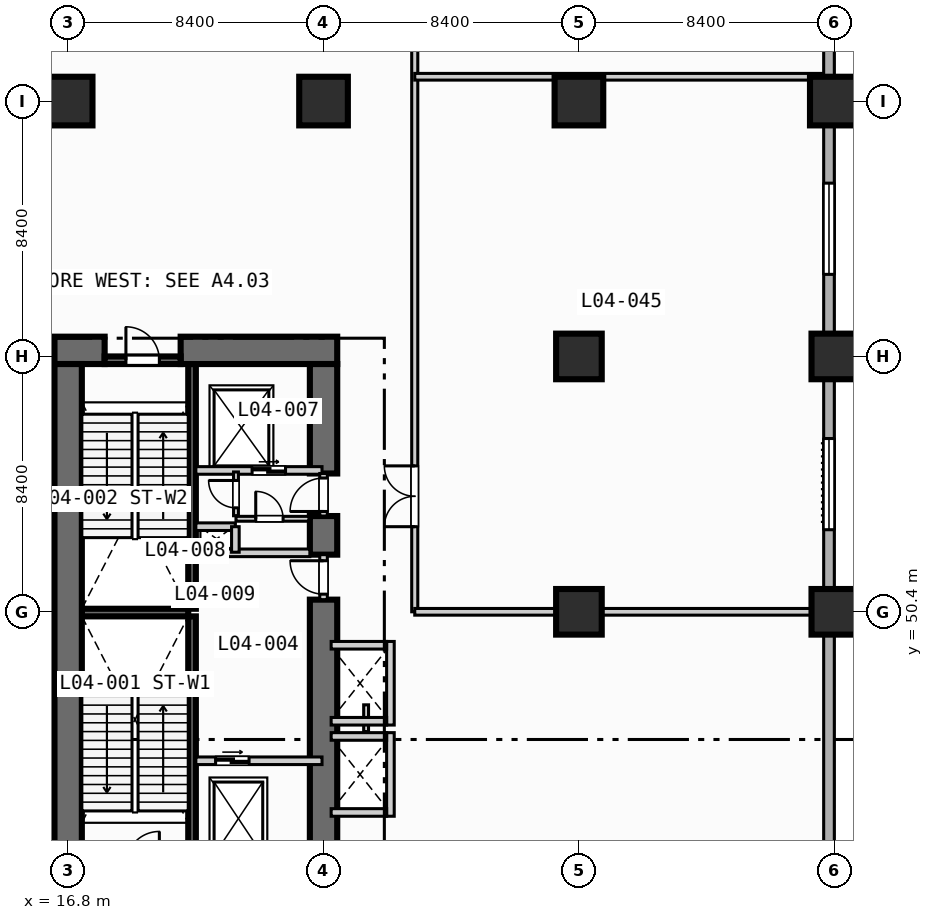
"""IFC4 building model, lengths in metres.
Left out: names, types, materials, properties, quantities, classifications, styles, units other than length and angle.
Written with IfcOpenShell. Run it as: python <this file> out.ifc"""

import sys

from ifc_helpers import new_model, si_unit, direction, frame, frame_2d, origin, origin_2d, place, context, subcontext, project, spatial, rectangle, extrude, element, fill, save


model = new_model("IFC4")
c1 = context("Model", 3, precision=1e-05, world=origin(), true_north=direction((0.0, 1.0)))
c2 = subcontext(c1, "Body", "Model", "MODEL_VIEW")
j1 = project(units=[si_unit("LENGTHUNIT", "METRE"), si_unit("PLANEANGLEUNIT", "RADIAN")], contexts=[c1])
p1 = place(None, origin())
s1 = spatial("IfcSite", under=j1, at=p1, CompositionType="ELEMENT")
p2 = place(p1, origin())
s2 = spatial("IfcBuilding", under=s1, at=p2, CompositionType="ELEMENT")
p3 = place(p2, frame((0.0, 0.0, 20.8)))
s3 = spatial("IfcBuildingStorey", under=s2, at=p3, CompositionType="ELEMENT", Elevation=20.8)
for number, where, z_axis, x_axis in (
    (1, (20.875, 42.2, 0.0), (0.0, 0.0, 1.0), (0.0, 1.0, 0.0)),
    (2, (20.875, 50.5, 0.0), (0.0, 0.0, 1.0), (0.0, 1.0, 0.0)),
):
    element("IfcWall", number, at=place(p3, frame(where, z_axis=z_axis, x_axis=x_axis)), inside=s3, PredefinedType="SOLIDWALL", context=c2, shape_type="SweptSolid", body=[
        extrude(rectangle(XDim=8.05, YDim=0.25, at=frame_2d((4.025, 0.0))), origin(), (0.0, 0.0, 1.0), 4.75),
    ])
p4 = place(p3, frame((17.25, 50.375, 0.0), z_axis=(0.0, 0.0, 1.0), x_axis=(1.0, 0.0, 0.0)))
e3 = element("IfcWall", 3, at=p4, inside=s3, PredefinedType="SOLIDWALL", context=c2, shape_type="SweptSolid", body=[
    extrude(rectangle(XDim=3.5, YDim=0.25, at=frame_2d((1.75, 0.0))), origin(), (0.0, 0.0, 1.0), 4.75),
])
p5 = place(p3, frame((16.35, 59.0, 0.0), z_axis=(0.0, 0.0, 1.0), x_axis=(1.0, 0.0, 0.0)))
e4 = element("IfcWall", 4, at=p5, inside=s3, PredefinedType="SHEAR", context=c2, shape_type="SweptSolid", body=[
    extrude(rectangle(XDim=1.65, YDim=0.9, at=frame_2d((0.825, 0.0))), origin(), (0.0, 0.0, 1.0), 4.75),
])
p6 = place(p3, frame((20.5, 59.0, 0.0), z_axis=(0.0, 0.0, 1.0), x_axis=(1.0, 0.0, 0.0)))
e5 = element("IfcWall", 5, at=p6, inside=s3, PredefinedType="SHEAR", context=c2, shape_type="SweptSolid", body=[
    extrude(rectangle(XDim=5.15, YDim=0.9, at=frame_2d((2.575, 0.0))), origin(), (0.0, 0.0, 1.0), 4.75),
])
p7 = place(p3, frame((16.8, 42.2, 0.0), z_axis=(0.0, 0.0, 1.0), x_axis=(0.0, 1.0, 0.0)))
e6 = element("IfcWall", 6, at=p7, inside=s3, PredefinedType="SHEAR", context=c2, shape_type="SweptSolid", body=[
    extrude(rectangle(XDim=16.35, YDim=0.9, at=frame_2d((8.175, 0.0))), origin(), (0.0, 0.0, 1.0), 4.75),
])
p8 = place(p3, frame((25.2, 42.2, 0.0), z_axis=(0.0, 0.0, 1.0), x_axis=(0.0, 1.0, 0.0)))
e7 = element("IfcWall", 7, at=p8, inside=s3, PredefinedType="SHEAR", context=c2, shape_type="SweptSolid", body=[
    extrude(rectangle(XDim=8.6, YDim=0.9, at=frame_2d((4.3, 0.0))), origin(), (0.0, 0.0, 1.0), 4.75),
])
p9 = place(p3, frame((25.2, 52.28, 0.0), z_axis=(0.0, 0.0, 1.0), x_axis=(0.0, 1.0, 0.0)))
e8 = element("IfcWall", 8, at=p9, inside=s3, PredefinedType="SHEAR", context=c2, shape_type="SweptSolid", body=[
    extrude(rectangle(XDim=1.27, YDim=0.9, at=frame_2d((0.635, 0.0))), origin(), (0.0, 0.0, 1.0), 4.75),
])
p10 = place(p3, frame((25.2, 54.95, 0.0), z_axis=(0.0, 0.0, 1.0), x_axis=(0.0, 1.0, 0.0)))
e9 = element("IfcWall", 9, at=p10, inside=s3, PredefinedType="SHEAR", context=c2, shape_type="SweptSolid", body=[
    extrude(rectangle(XDim=3.6, YDim=0.9, at=frame_2d((1.8, 0.0))), origin(), (0.0, 0.0, 1.0), 4.75),
])
for number, where, z_axis, x_axis in (
    (10, (16.8, 67.2, 0.0), (0.0, 0.0, 1.0), (1.0, 0.0, 0.0)),
    (11, (25.2, 67.2, 0.0), (0.0, 0.0, 1.0), (1.0, 0.0, 0.0)),
):
    element("IfcColumn", number, at=place(p3, frame(where, z_axis=z_axis, x_axis=x_axis)), inside=s3, PredefinedType="COLUMN", context=c2, shape_type="SweptSolid", body=[
        extrude(rectangle(XDim=1.6, YDim=1.6, at=origin_2d()), origin(), (0.0, 0.0, 1.0), 5.2),
    ])
for number, where, z_axis, x_axis in (
    (12, (33.6, 50.4, 0.0), (0.0, 0.0, 1.0), (1.0, 0.0, 0.0)),
    (13, (33.6, 58.8, 0.0), (0.0, 0.0, 1.0), (1.0, 0.0, 0.0)),
):
    element("IfcColumn", number, at=place(p3, frame(where, z_axis=z_axis, x_axis=x_axis)), inside=s3, PredefinedType="COLUMN", context=c2, shape_type="SweptSolid", body=[
        extrude(rectangle(XDim=1.5, YDim=1.5, at=origin_2d()), origin(), (0.0, 0.0, 1.0), 5.2),
    ])
p11 = place(p3, frame((33.6, 67.2, 0.0), z_axis=(0.0, 0.0, 1.0), x_axis=(1.0, 0.0, 0.0)))
e14 = element("IfcColumn", 14, at=p11, inside=s3, PredefinedType="COLUMN", context=c2, shape_type="SweptSolid", body=[
    extrude(rectangle(XDim=1.6, YDim=1.6, at=origin_2d()), origin(), (0.0, 0.0, 1.0), 5.2),
])
for number, where, z_axis, x_axis in (
    (15, (42.0, 50.4, 0.0), (0.0, 0.0, 1.0), (1.0, 0.0, 0.0)),
    (16, (42.0, 58.8, 0.0), (0.0, 0.0, 1.0), (1.0, 0.0, 0.0)),
):
    element("IfcColumn", number, at=place(p3, frame(where, z_axis=z_axis, x_axis=x_axis)), inside=s3, PredefinedType="COLUMN", context=c2, shape_type="SweptSolid", body=[
        extrude(rectangle(XDim=1.5, YDim=1.5, at=origin_2d()), origin(), (0.0, 0.0, 1.0), 5.2),
    ])
p12 = place(p3, frame((42.0, 67.2, 0.0), z_axis=(0.0, 0.0, 1.0), x_axis=(1.0, 0.0, 0.0)))
e17 = element("IfcColumn", 17, at=p12, inside=s3, PredefinedType="COLUMN", context=c2, shape_type="SweptSolid", body=[
    extrude(rectangle(XDim=1.6, YDim=1.6, at=origin_2d()), origin(), (0.0, 0.0, 1.0), 5.2),
])
p13 = place(p3, frame((41.825, 89.225, 0.0), z_axis=(0.0, 0.0, 1.0), x_axis=(0.0, -1.0, 0.0)))
e18 = element("IfcWall", 18, at=p13, inside=s3, PredefinedType="STANDARD", context=c2, shape_type="SweptSolid", body=[
    extrude(rectangle(XDim=47.4, YDim=0.35, at=frame_2d((23.7, 0.0))), origin(), (0.0, 0.0, 1.0), 4.75),
])
p14 = place(p13, frame((33.125, 0.0, 0.85)))
e19 = element("IfcOpeningElement", 19, at=p14, cuts=e18, PredefinedType="OPENING", context=c2, shape_type="SweptSolid", body=[
    extrude(rectangle(XDim=3.0, YDim=2.4, at=frame_2d((1.5, 1.2))), frame((0.0, 0.185, 0.0), z_axis=(0.0, -1.0, 0.0), x_axis=(1.0, 0.0, 0.0)), (0.0, 0.0, 1.0), 0.37),
])
p15 = place(p13, frame((24.725, 0.0, 0.85)))
e20 = element("IfcOpeningElement", 20, at=p15, cuts=e18, PredefinedType="OPENING", context=c2, shape_type="SweptSolid", body=[
    extrude(rectangle(XDim=3.0, YDim=2.4, at=frame_2d((1.5, 1.2))), frame((0.0, 0.185, 0.0), z_axis=(0.0, -1.0, 0.0), x_axis=(1.0, 0.0, 0.0)), (0.0, 0.0, 1.0), 0.37),
])
p16 = place(p13, frame((16.325, 0.0, 0.85)))
e21 = element("IfcOpeningElement", 21, at=p16, cuts=e18, PredefinedType="OPENING", context=c2, shape_type="SweptSolid", body=[
    extrude(rectangle(XDim=3.0, YDim=2.4, at=frame_2d((1.5, 1.2))), frame((0.0, 0.185, 0.0), z_axis=(0.0, -1.0, 0.0), x_axis=(1.0, 0.0, 0.0)), (0.0, 0.0, 1.0), 0.37),
])
p17 = place(p13, frame((7.925, 0.0, 0.85)))
e22 = element("IfcOpeningElement", 22, at=p17, cuts=e18, PredefinedType="OPENING", context=c2, shape_type="SweptSolid", body=[
    extrude(rectangle(XDim=3.0, YDim=2.4, at=frame_2d((1.5, 1.2))), frame((0.0, 0.185, 0.0), z_axis=(0.0, -1.0, 0.0), x_axis=(1.0, 0.0, 0.0)), (0.0, 0.0, 1.0), 0.37),
])
p18 = place(p3, frame((18.0, 58.675, 0.0), z_axis=(0.0, 0.0, 1.0), x_axis=(1.0, 0.0, 0.0)))
e23 = element("IfcWall", 23, at=p18, inside=s3, PredefinedType="SOLIDWALL", context=c2, shape_type="SweptSolid", body=[
    extrude(rectangle(XDim=2.5, YDim=0.25, at=frame_2d((1.25, 0.0))), origin(), (0.0, 0.0, 1.0), 4.75),
])
p19 = place(p18, frame((0.7, 0.0, 0.0)))
e24 = element("IfcOpeningElement", 24, at=p19, cuts=e23, PredefinedType="OPENING", context=c2, shape_type="SweptSolid", body=[
    extrude(rectangle(XDim=1.1, YDim=2.15, at=frame_2d((0.55, 1.075))), frame((0.0, 0.135, 0.0), z_axis=(0.0, -1.0, 0.0), x_axis=(1.0, 0.0, 0.0)), (0.0, 0.0, 1.0), 0.27),
])
p20 = place(p3, frame((21.0, 45.5, 0.0), z_axis=(0.0, 0.0, 1.0), x_axis=(1.0, 0.0, 0.0)))
e25 = element("IfcWall", 25, at=p20, inside=s3, PredefinedType="SOLIDWALL", context=c2, shape_type="SweptSolid", body=[
    extrude(rectangle(XDim=4.15, YDim=0.25, at=frame_2d((2.075, 0.0))), origin(), (0.0, 0.0, 1.0), 4.75),
])
p21 = place(p20, frame((0.65, 0.0, 0.0)))
e26 = element("IfcOpeningElement", 26, at=p21, cuts=e25, PredefinedType="OPENING", context=c2, shape_type="SweptSolid", body=[
    extrude(rectangle(XDim=1.1, YDim=2.15, at=frame_2d((0.55, 1.075))), frame((0.0, 0.135, 0.0), z_axis=(0.0, -1.0, 0.0), x_axis=(1.0, 0.0, 0.0)), (0.0, 0.0, 1.0), 0.27),
])
p22 = place(p3, frame((25.2, 50.8, 0.0), z_axis=(0.0, 0.0, 1.0), x_axis=(0.0, 1.0, 0.0)))
e27 = element("IfcWall", 27, at=p22, inside=s3, PredefinedType="SOLIDWALL", context=c2, shape_type="SweptSolid", body=[
    extrude(rectangle(XDim=1.48, YDim=0.25, at=frame_2d((0.74, 0.0))), origin(), (0.0, 0.0, 1.0), 4.75),
])
p23 = place(p22, frame((0.18, 0.0, 0.0)))
e28 = element("IfcOpeningElement", 28, at=p23, cuts=e27, PredefinedType="OPENING", context=c2, shape_type="SweptSolid", body=[
    extrude(rectangle(XDim=1.1, YDim=2.15, at=frame_2d((0.55, 1.075))), frame((0.0, 0.135, 0.0), z_axis=(0.0, -1.0, 0.0), x_axis=(1.0, 0.0, 0.0)), (0.0, 0.0, 1.0), 0.27),
])
p24 = place(p3, frame((21.0, 52.34, 0.0), z_axis=(0.0, 0.0, 1.0), x_axis=(1.0, 0.0, 0.0)))
e29 = element("IfcWall", 29, at=p24, inside=s3, PredefinedType="SOLIDWALL", context=c2, shape_type="SweptSolid", body=[
    extrude(rectangle(XDim=3.75, YDim=0.25, at=frame_2d((1.875, 0.0))), origin(), (0.0, 0.0, 1.0), 4.75),
])
p25 = place(p3, frame((21.0, 55.05, 0.0), z_axis=(0.0, 0.0, 1.0), x_axis=(1.0, 0.0, 0.0)))
e30 = element("IfcWall", 30, at=p25, inside=s3, PredefinedType="SOLIDWALL", context=c2, shape_type="SweptSolid", body=[
    extrude(rectangle(XDim=4.15, YDim=0.25, at=frame_2d((2.075, 0.0))), origin(), (0.0, 0.0, 1.0), 4.75),
])
p26 = place(p25, frame((1.85, 0.0, 0.0)))
e31 = element("IfcOpeningElement", 31, at=p26, cuts=e30, PredefinedType="OPENING", context=c2, shape_type="SweptSolid", body=[
    extrude(rectangle(XDim=1.1, YDim=2.15, at=frame_2d((0.55, 1.075))), frame((0.0, 0.135, 0.0), z_axis=(0.0, -1.0, 0.0), x_axis=(1.0, 0.0, 0.0)), (0.0, 0.0, 1.0), 0.27),
])
p27 = place(p3, frame((25.2, 53.55, 0.0), z_axis=(0.0, 0.0, 1.0), x_axis=(0.0, 1.0, 0.0)))
e32 = element("IfcWall", 32, at=p27, inside=s3, PredefinedType="SOLIDWALL", context=c2, shape_type="SweptSolid", body=[
    extrude(rectangle(XDim=1.4, YDim=0.25, at=frame_2d((0.7, 0.0))), origin(), (0.0, 0.0, 1.0), 4.75),
])
p28 = place(p27, frame((0.15, 0.0, 0.0)))
e33 = element("IfcOpeningElement", 33, at=p28, cuts=e32, PredefinedType="OPENING", context=c2, shape_type="SweptSolid", body=[
    extrude(rectangle(XDim=1.1, YDim=2.15, at=frame_2d((0.55, 1.075))), frame((0.0, 0.135, 0.0), z_axis=(0.0, -1.0, 0.0), x_axis=(1.0, 0.0, 0.0)), (0.0, 0.0, 1.0), 0.27),
])
p29 = place(p3, frame((21.0, 53.2, 0.0), z_axis=(0.0, 0.0, 1.0), x_axis=(1.0, 0.0, 0.0)))
e34 = element("IfcWall", 34, at=p29, inside=s3, PredefinedType="SOLIDWALL", context=c2, shape_type="SweptSolid", body=[
    extrude(rectangle(XDim=1.3, YDim=0.25, at=frame_2d((0.65, 0.0))), origin(), (0.0, 0.0, 1.0), 4.75),
])
p30 = place(p3, frame((22.3, 52.36, 0.0), z_axis=(0.0, 0.0, 1.0), x_axis=(0.0, 1.0, 0.0)))
e35 = element("IfcWall", 35, at=p30, inside=s3, PredefinedType="SOLIDWALL", context=c2, shape_type="SweptSolid", body=[
    extrude(rectangle(XDim=0.84, YDim=0.25, at=frame_2d((0.42, 0.0))), origin(), (0.0, 0.0, 1.0), 4.75),
])
p31 = place(p3, frame((22.32, 53.56, 0.0), z_axis=(0.0, 0.0, 1.0), x_axis=(0.0, 1.0, 0.0)))
e36 = element("IfcWall", 36, at=p31, inside=s3, PredefinedType="PARTITIONING", context=c2, shape_type="SweptSolid", body=[
    extrude(rectangle(XDim=1.44, YDim=0.16, at=frame_2d((0.72, 0.0))), origin(), (0.0, 0.0, 1.0), 4.75),
])
p32 = place(p31, frame((0.26, 0.0, 0.0)))
e37 = element("IfcOpeningElement", 37, at=p32, cuts=e36, PredefinedType="OPENING", context=c2, shape_type="SweptSolid", body=[
    extrude(rectangle(XDim=0.9, YDim=2.1, at=frame_2d((0.45, 1.05))), frame((0.0, 0.09, 0.0), z_axis=(0.0, -1.0, 0.0), x_axis=(1.0, 0.0, 0.0)), (0.0, 0.0, 1.0), 0.18),
])
p33 = place(p3, frame((22.32, 53.46, 0.0), z_axis=(0.0, 0.0, 1.0), x_axis=(1.0, 0.0, 0.0)))
e38 = element("IfcWall", 38, at=p33, inside=s3, PredefinedType="PARTITIONING", context=c2, shape_type="SweptSolid", body=[
    extrude(rectangle(XDim=2.4, YDim=0.16, at=frame_2d((1.2, 0.0))), origin(), (0.0, 0.0, 1.0), 4.75),
])
p34 = place(p33, frame((0.65, 0.0, 0.0)))
e39 = element("IfcOpeningElement", 39, at=p34, cuts=e38, PredefinedType="OPENING", context=c2, shape_type="SweptSolid", body=[
    extrude(rectangle(XDim=0.9, YDim=2.1, at=frame_2d((0.45, 1.05))), frame((0.0, 0.09, 0.0), z_axis=(0.0, -1.0, 0.0), x_axis=(1.0, 0.0, 0.0)), (0.0, 0.0, 1.0), 0.18),
])
p35 = place(p3, frame((27.4, 43.675, 0.0), z_axis=(0.0, 0.0, 1.0), x_axis=(0.0, 1.0, 0.0)))
e40 = element("IfcWall", 40, at=p35, inside=s3, PredefinedType="SOLIDWALL", context=c2, shape_type="SweptSolid", body=[
    extrude(rectangle(XDim=2.75, YDim=0.25, at=frame_2d((1.375, 0.0))), origin(), (0.0, 0.0, 1.0), 4.75),
])
for number, where, z_axis, x_axis in (
    (41, (25.45, 43.8, 0.0), (0.0, 0.0, 1.0), (1.0, 0.0, 0.0)),
    (42, (25.45, 46.3, 0.0), (0.0, 0.0, 1.0), (1.0, 0.0, 0.0)),
):
    element("IfcWall", number, at=place(p3, frame(where, z_axis=z_axis, x_axis=x_axis)), inside=s3, PredefinedType="SOLIDWALL", context=c2, shape_type="SweptSolid", body=[
        extrude(rectangle(XDim=1.825, YDim=0.25, at=frame_2d((0.913, 0.0))), origin(), (0.0, 0.0, 1.0), 4.75),
    ])
p36 = place(p3, frame((26.6, 46.46, 0.0), z_axis=(0.0, 0.0, 1.0), x_axis=(0.0, 1.0, 0.0)))
e43 = element("IfcWall", 43, at=p36, inside=s3, PredefinedType="PARTITIONING", context=c2, shape_type="SweptSolid", body=[
    extrude(rectangle(XDim=0.88, YDim=0.16, at=frame_2d((0.44, 0.0))), origin(), (0.0, 0.0, 1.0), 4.75),
])
p37 = place(p3, frame((27.4, 46.675, 0.0), z_axis=(0.0, 0.0, 1.0), x_axis=(0.0, 1.0, 0.0)))
e44 = element("IfcWall", 44, at=p37, inside=s3, PredefinedType="SOLIDWALL", context=c2, shape_type="SweptSolid", body=[
    extrude(rectangle(XDim=2.75, YDim=0.25, at=frame_2d((1.375, 0.0))), origin(), (0.0, 0.0, 1.0), 4.75),
])
for number, where, z_axis, x_axis in (
    (45, (25.45, 46.8, 0.0), (0.0, 0.0, 1.0), (1.0, 0.0, 0.0)),
    (46, (25.45, 49.3, 0.0), (0.0, 0.0, 1.0), (1.0, 0.0, 0.0)),
):
    element("IfcWall", number, at=place(p3, frame(where, z_axis=z_axis, x_axis=x_axis)), inside=s3, PredefinedType="SOLIDWALL", context=c2, shape_type="SweptSolid", body=[
        extrude(rectangle(XDim=1.825, YDim=0.25, at=frame_2d((0.913, 0.0))), origin(), (0.0, 0.0, 1.0), 4.75),
    ])
p38 = place(p3, frame((28.2, 50.4, 0.0), z_axis=(0.0, 0.0, 1.0), x_axis=(0.0, 1.0, 0.0)))
e47 = element("IfcWall", 47, at=p38, inside=s3, PredefinedType="PARTITIONING", context=c2, shape_type="SweptSolid", body=[
    extrude(rectangle(XDim=38.6, YDim=0.2, at=frame_2d((19.3, 0.0))), origin(), (0.0, 0.0, 1.0), 4.75),
])
p39 = place(p38, frame((2.8, 0.0, 0.0)))
e48 = element("IfcOpeningElement", 48, at=p39, cuts=e47, PredefinedType="OPENING", context=c2, shape_type="SweptSolid", body=[
    extrude(rectangle(XDim=2.0, YDim=2.15, at=frame_2d((1.0, 1.075))), frame((0.0, 0.11, 0.0), z_axis=(0.0, -1.0, 0.0), x_axis=(1.0, 0.0, 0.0)), (0.0, 0.0, 1.0), 0.22),
])
p40 = place(p38, frame((20.4, 0.0, 0.0)))
e49 = element("IfcOpeningElement", 49, at=p40, cuts=e47, PredefinedType="OPENING", context=c2, shape_type="SweptSolid", body=[
    extrude(rectangle(XDim=2.0, YDim=2.15, at=frame_2d((1.0, 1.075))), frame((0.0, 0.11, 0.0), z_axis=(0.0, -1.0, 0.0), x_axis=(1.0, 0.0, 0.0)), (0.0, 0.0, 1.0), 0.22),
])
p41 = place(p3, frame((28.2, 50.4, 0.0), z_axis=(0.0, 0.0, 1.0), x_axis=(1.0, 0.0, 0.0)))
e50 = element("IfcWall", 50, at=p41, inside=s3, PredefinedType="PARTITIONING", context=c2, shape_type="SweptSolid", body=[
    extrude(rectangle(XDim=13.4, YDim=0.22, at=frame_2d((6.7, 0.0))), origin(), (0.0, 0.0, 1.0), 3.9),
])
p42 = place(p3, frame((28.2, 68.0, 0.0), z_axis=(0.0, 0.0, 1.0), x_axis=(1.0, 0.0, 0.0)))
e51 = element("IfcWall", 51, at=p42, inside=s3, PredefinedType="PARTITIONING", context=c2, shape_type="SweptSolid", body=[
    extrude(rectangle(XDim=13.4, YDim=0.22, at=frame_2d((6.7, 0.0))), origin(), (0.0, 0.0, 1.0), 4.75),
])
p43 = place(p14, origin())
e52 = element("IfcWindow", 52, at=p43, inside=s3, PartitioningType="SINGLE_PANEL", PredefinedType="WINDOW", context=c2, shape_type="SweptSolid", body=[
    extrude(rectangle(XDim=3.0, YDim=2.4, at=frame_2d((1.5, 1.2))), frame((0.0, 0.03, 0.0), z_axis=(0.0, -1.0, 0.0), x_axis=(1.0, 0.0, 0.0)), (0.0, 0.0, 1.0), 0.06),
])
fill(e19, e52)
p44 = place(p15, origin())
e53 = element("IfcWindow", 53, at=p44, inside=s3, PartitioningType="SINGLE_PANEL", PredefinedType="WINDOW", context=c2, shape_type="SweptSolid", body=[
    extrude(rectangle(XDim=3.0, YDim=2.4, at=frame_2d((1.5, 1.2))), frame((0.0, 0.03, 0.0), z_axis=(0.0, -1.0, 0.0), x_axis=(1.0, 0.0, 0.0)), (0.0, 0.0, 1.0), 0.06),
])
fill(e20, e53)
p45 = place(p19, origin())
e54 = element("IfcDoor", 54, at=p45, inside=s3, OperationType="SINGLE_SWING_LEFT", PredefinedType="DOOR", context=c2, shape_type="SweptSolid", body=[
    extrude(rectangle(XDim=1.1, YDim=2.15, at=frame_2d((0.55, 1.075))), frame((0.0, 0.025, 0.0), z_axis=(0.0, -1.0, 0.0), x_axis=(1.0, 0.0, 0.0)), (0.0, 0.0, 1.0), 0.05),
])
fill(e24, e54)
p46 = place(p21, origin())
e55 = element("IfcDoor", 55, at=p46, inside=s3, OperationType="SLIDING_TO_LEFT", PredefinedType="DOOR", context=c2, shape_type="SweptSolid", body=[
    extrude(rectangle(XDim=1.1, YDim=2.15, at=frame_2d((0.55, 1.075))), frame((0.0, 0.025, 0.0), z_axis=(0.0, -1.0, 0.0), x_axis=(1.0, 0.0, 0.0)), (0.0, 0.0, 1.0), 0.05),
])
fill(e26, e55)
p47 = place(p23, origin())
e56 = element("IfcDoor", 56, at=p47, inside=s3, OperationType="SINGLE_SWING_RIGHT", PredefinedType="DOOR", context=c2, shape_type="SweptSolid", body=[
    extrude(rectangle(XDim=1.1, YDim=2.15, at=frame_2d((0.55, 1.075))), frame((0.0, 0.025, 0.0), z_axis=(0.0, -1.0, 0.0), x_axis=(1.0, 0.0, 0.0)), (0.0, 0.0, 1.0), 0.05),
])
fill(e28, e56)
p48 = place(p26, origin())
e57 = element("IfcDoor", 57, at=p48, inside=s3, OperationType="SLIDING_TO_LEFT", PredefinedType="DOOR", context=c2, shape_type="SweptSolid", body=[
    extrude(rectangle(XDim=1.1, YDim=2.15, at=frame_2d((0.55, 1.075))), frame((0.0, 0.025, 0.0), z_axis=(0.0, -1.0, 0.0), x_axis=(1.0, 0.0, 0.0)), (0.0, 0.0, 1.0), 0.05),
])
fill(e31, e57)
p49 = place(p28, origin())
e58 = element("IfcDoor", 58, at=p49, inside=s3, OperationType="SINGLE_SWING_LEFT", PredefinedType="DOOR", context=c2, shape_type="SweptSolid", body=[
    extrude(rectangle(XDim=1.1, YDim=2.15, at=frame_2d((0.55, 1.075))), frame((0.0, 0.025, 0.0), z_axis=(0.0, -1.0, 0.0), x_axis=(1.0, 0.0, 0.0)), (0.0, 0.0, 1.0), 0.05),
])
fill(e33, e58)
p50 = place(p32, origin())
e59 = element("IfcDoor", 59, at=p50, inside=s3, OperationType="SINGLE_SWING_RIGHT", PredefinedType="DOOR", context=c2, shape_type="SweptSolid", body=[
    extrude(rectangle(XDim=0.9, YDim=2.1, at=frame_2d((0.45, 1.05))), frame((0.0, 0.025, 0.0), z_axis=(0.0, -1.0, 0.0), x_axis=(1.0, 0.0, 0.0)), (0.0, 0.0, 1.0), 0.05),
])
fill(e37, e59)
p51 = place(p34, origin())
e60 = element("IfcDoor", 60, at=p51, inside=s3, OperationType="SINGLE_SWING_LEFT", PredefinedType="DOOR", context=c2, shape_type="SweptSolid", body=[
    extrude(rectangle(XDim=0.9, YDim=2.1, at=frame_2d((0.45, 1.05))), frame((0.0, 0.025, 0.0), z_axis=(0.0, -1.0, 0.0), x_axis=(1.0, 0.0, 0.0)), (0.0, 0.0, 1.0), 0.05),
])
fill(e39, e60)
p52 = place(p39, origin())
e61 = element("IfcDoor", 61, at=p52, inside=s3, OperationType="SINGLE_SWING_LEFT", PredefinedType="DOOR", context=c2, shape_type="SweptSolid", body=[
    extrude(rectangle(XDim=2.0, YDim=2.15, at=frame_2d((1.0, 1.075))), frame((0.0, 0.025, 0.0), z_axis=(0.0, -1.0, 0.0), x_axis=(1.0, 0.0, 0.0)), (0.0, 0.0, 1.0), 0.05),
])
fill(e48, e61)
save(model, sys.argv[1])
